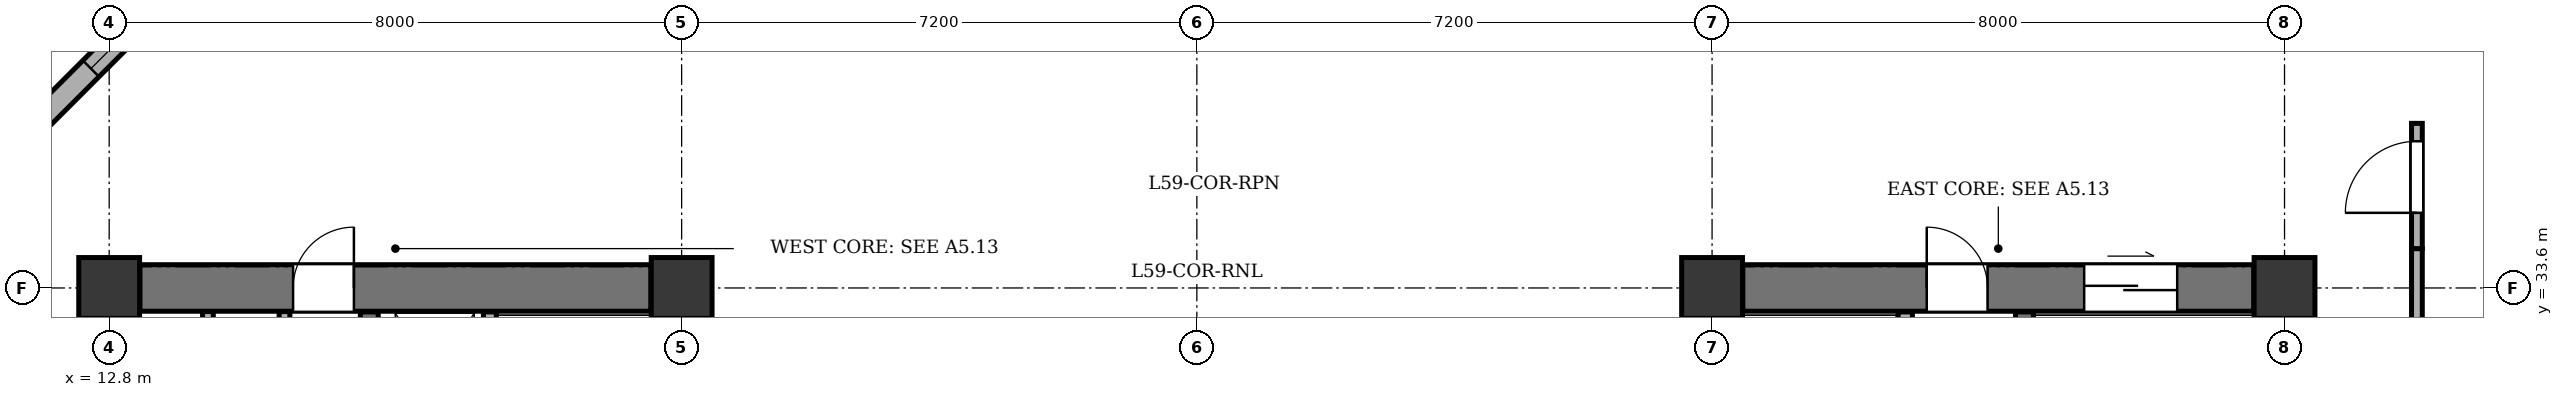
"""IFC4 building model, lengths in metres.
Left out: names, types, materials, properties, quantities, classifications, styles, units other than length and angle.
Written with IfcOpenShell. Run it as: python <this file> out.ifc"""

import sys

from ifc_helpers import new_model, si_unit, direction, frame, frame_2d, origin, origin_2d, place, context, subcontext, project, spatial, rectangle, extrude, element, fill, save


model = new_model("IFC4")
c1 = context("Model", 3, precision=1e-05, world=origin(), true_north=direction((0.0, 1.0)))
c2 = subcontext(c1, "Body", "Model", "MODEL_VIEW")
j1 = project(units=[si_unit("LENGTHUNIT", "METRE"), si_unit("PLANEANGLEUNIT", "RADIAN")], contexts=[c1])
p1 = place(None, origin())
s1 = spatial("IfcSite", under=j1, at=p1, CompositionType="ELEMENT")
p2 = place(p1, origin())
s2 = spatial("IfcBuilding", under=s1, at=p2, CompositionType="ELEMENT")
p3 = place(p2, frame((0.0, 0.0, 227.9)))
s3 = spatial("IfcBuildingStorey", under=s2, at=p3, CompositionType="ELEMENT", Elevation=227.9)
for number, where, z_axis, x_axis in (
    (1, (12.8, 33.6, 0.0), (0.0, 0.0, 1.0), (1.0, 0.0, 0.0)),
    (2, (20.8, 33.6, 0.0), (0.0, 0.0, 1.0), (1.0, 0.0, 0.0)),
    (3, (35.2, 33.6, 0.0), (0.0, 0.0, 1.0), (1.0, 0.0, 0.0)),
    (4, (43.2, 33.6, 0.0), (0.0, 0.0, 1.0), (1.0, 0.0, 0.0)),
):
    element("IfcColumn", number, at=place(p3, frame(where, z_axis=z_axis, x_axis=x_axis)), inside=s3, PredefinedType="COLUMN", context=c2, shape_type="SweptSolid", body=[
        extrude(rectangle(XDim=0.85, YDim=0.85, at=origin_2d()), origin(), (0.0, 0.0, 1.0), 3.4),
    ])
p4 = place(p3, frame((10.88, 35.0, 0.0), z_axis=(0.0, 0.0, 1.0), x_axis=(0.707106781187, 0.707106781187, 0.0)))
e5 = element("IfcWall", 5, at=p4, inside=s3, PredefinedType="STANDARD", context=c2, shape_type="SweptSolid", body=[
    extrude(rectangle(XDim=6.11, YDim=0.32, at=frame_2d((3.055, 0.0))), origin(), (0.0, 0.0, 1.0), 2.725),
])
p5 = place(p4, frame((2.355, 0.0, 0.75)))
e6 = element("IfcOpeningElement", 6, at=p5, cuts=e5, PredefinedType="OPENING", context=c2, shape_type="SweptSolid", body=[
    extrude(rectangle(XDim=1.4, YDim=1.65, at=frame_2d((0.7, 0.825))), frame((0.0, 0.17, 0.0), z_axis=(0.0, -1.0, 0.0), x_axis=(1.0, 0.0, 0.0)), (0.0, 0.0, 1.0), 0.34),
])
p6 = place(p3, frame((13.23, 33.6, 0.0), z_axis=(0.0, 0.0, 1.0), x_axis=(1.0, 0.0, 0.0)))
e7 = element("IfcWall", 7, at=p6, inside=s3, PredefinedType="SHEAR", context=c2, shape_type="SweptSolid", body=[
    extrude(rectangle(XDim=7.14, YDim=0.65, at=frame_2d((3.57, 0.0))), origin(), (0.0, 0.0, 1.0), 3.1),
])
p7 = place(p6, frame((2.14, 0.0, 0.0)))
e8 = element("IfcOpeningElement", 8, at=p7, cuts=e7, PredefinedType="OPENING", context=c2, shape_type="SweptSolid", body=[
    extrude(rectangle(XDim=0.85, YDim=2.02, at=frame_2d((0.425, 1.01))), frame((0.0, 0.335, 0.0), z_axis=(0.0, -1.0, 0.0), x_axis=(1.0, 0.0, 0.0)), (0.0, 0.0, 1.0), 0.67),
])
p8 = place(p3, frame((16.435, 21.135, 0.0), z_axis=(0.0, 0.0, 1.0), x_axis=(0.0, 1.0, 0.0)))
e9 = element("IfcWall", 9, at=p8, inside=s3, PredefinedType="SHEAR", context=c2, shape_type="SweptSolid", body=[
    extrude(rectangle(XDim=12.13, YDim=0.25, at=frame_2d((6.065, 0.0))), origin(), (0.0, 0.0, 1.0), 3.1),
])
p9 = place(p8, frame((0.515, 0.0, 0.0)))
e10 = element("IfcOpeningElement", 10, at=p9, cuts=e9, PredefinedType="OPENING", context=c2, shape_type="SweptSolid", body=[
    extrude(rectangle(XDim=1.2, YDim=2.15, at=frame_2d((0.6, 1.075))), frame((0.0, 0.135, 0.0), z_axis=(0.0, -1.0, 0.0), x_axis=(1.0, 0.0, 0.0)), (0.0, 0.0, 1.0), 0.27),
])
p10 = place(p8, frame((2.665, 0.0, 0.0)))
e11 = element("IfcOpeningElement", 11, at=p10, cuts=e9, PredefinedType="OPENING", context=c2, shape_type="SweptSolid", body=[
    extrude(rectangle(XDim=1.15, YDim=2.15, at=frame_2d((0.575, 1.075))), frame((0.0, 0.135, 0.0), z_axis=(0.0, -1.0, 0.0), x_axis=(1.0, 0.0, 0.0)), (0.0, 0.0, 1.0), 0.27),
])
p11 = place(p3, frame((18.12, 31.17, 0.0), z_axis=(0.0, 0.0, 1.0), x_axis=(0.0, 1.0, 0.0)))
e12 = element("IfcWall", 12, at=p11, inside=s3, PredefinedType="PARTITIONING", context=c2, shape_type="SweptSolid", body=[
    extrude(rectangle(XDim=2.095, YDim=0.18, at=frame_2d((1.047, 0.0))), origin(), (0.0, 0.0, 1.0), 3.1),
])
p12 = place(p3, frame((35.63, 33.6, 0.0), z_axis=(0.0, 0.0, 1.0), x_axis=(1.0, 0.0, 0.0)))
e13 = element("IfcWall", 13, at=p12, inside=s3, PredefinedType="SHEAR", context=c2, shape_type="SweptSolid", body=[
    extrude(rectangle(XDim=7.14, YDim=0.65, at=frame_2d((3.57, 0.0))), origin(), (0.0, 0.0, 1.0), 3.1),
])
p13 = place(p12, frame((4.77, 0.0, 0.0)))
e14 = element("IfcOpeningElement", 14, at=p13, cuts=e13, PredefinedType="OPENING", context=c2, shape_type="SweptSolid", body=[
    extrude(rectangle(XDim=1.3, YDim=2.15, at=frame_2d((0.65, 1.075))), frame((0.0, 0.335, 0.0), z_axis=(0.0, -1.0, 0.0), x_axis=(1.0, 0.0, 0.0)), (0.0, 0.0, 1.0), 0.67),
])
p14 = place(p12, frame((2.57, 0.0, 0.0)))
e15 = element("IfcOpeningElement", 15, at=p14, cuts=e13, PredefinedType="OPENING", context=c2, shape_type="SweptSolid", body=[
    extrude(rectangle(XDim=0.85, YDim=2.02, at=frame_2d((0.425, 1.01))), frame((0.0, 0.335, 0.0), z_axis=(0.0, -1.0, 0.0), x_axis=(1.0, 0.0, 0.0)), (0.0, 0.0, 1.0), 0.67),
])
p15 = place(p3, frame((39.565, 21.135, 0.0), z_axis=(0.0, 0.0, 1.0), x_axis=(0.0, 1.0, 0.0)))
e16 = element("IfcWall", 16, at=p15, inside=s3, PredefinedType="SHEAR", context=c2, shape_type="SweptSolid", body=[
    extrude(rectangle(XDim=12.13, YDim=0.25, at=frame_2d((6.065, 0.0))), origin(), (0.0, 0.0, 1.0), 3.1),
])
p16 = place(p15, frame((0.515, 0.0, 0.0)))
e17 = element("IfcOpeningElement", 17, at=p16, cuts=e16, PredefinedType="OPENING", context=c2, shape_type="SweptSolid", body=[
    extrude(rectangle(XDim=1.2, YDim=2.15, at=frame_2d((0.6, 1.075))), frame((0.0, 0.135, 0.0), z_axis=(0.0, -1.0, 0.0), x_axis=(1.0, 0.0, 0.0)), (0.0, 0.0, 1.0), 0.27),
])
p17 = place(p15, frame((2.665, 0.0, 0.0)))
e18 = element("IfcOpeningElement", 18, at=p17, cuts=e16, PredefinedType="OPENING", context=c2, shape_type="SweptSolid", body=[
    extrude(rectangle(XDim=1.15, YDim=2.15, at=frame_2d((0.575, 1.075))), frame((0.0, 0.135, 0.0), z_axis=(0.0, -1.0, 0.0), x_axis=(1.0, 0.0, 0.0)), (0.0, 0.0, 1.0), 0.27),
])
p18 = place(p3, frame((37.9, 25.27, 0.0), z_axis=(0.0, 0.0, 1.0), x_axis=(0.0, 1.0, 0.0)))
e19 = element("IfcWall", 19, at=p18, inside=s3, PredefinedType="SOLIDWALL", context=c2, shape_type="SweptSolid", body=[
    extrude(rectangle(XDim=7.995, YDim=0.2, at=frame_2d((3.998, 0.0))), origin(), (0.0, 0.0, 1.0), 3.1),
])
p19 = place(p3, frame((14.18, 30.96, 0.0), z_axis=(0.0, 0.0, 1.0), x_axis=(0.0, 1.0, 0.0)))
e20 = element("IfcWall", 20, at=p19, inside=s3, PredefinedType="PARTITIONING", context=c2, shape_type="SweptSolid", body=[
    extrude(rectangle(XDim=2.31, YDim=0.15, at=frame_2d((1.155, 0.0))), origin(), (0.0, 0.0, 1.0), 3.1),
])
p20 = place(p19, frame((0.47, 0.0, 0.0)))
e21 = element("IfcOpeningElement", 21, at=p20, cuts=e20, PredefinedType="OPENING", context=c2, shape_type="SweptSolid", body=[
    extrude(rectangle(XDim=0.85, YDim=2.02, at=frame_2d((0.425, 1.01))), frame((0.0, 0.085, 0.0), z_axis=(0.0, -1.0, 0.0), x_axis=(1.0, 0.0, 0.0)), (0.0, 0.0, 1.0), 0.17),
])
p21 = place(p3, frame((15.25, 30.96, 0.0), z_axis=(0.0, 0.0, 1.0), x_axis=(0.0, 1.0, 0.0)))
e22 = element("IfcWall", 22, at=p21, inside=s3, PredefinedType="PARTITIONING", context=c2, shape_type="SweptSolid", body=[
    extrude(rectangle(XDim=2.31, YDim=0.15, at=frame_2d((1.155, 0.0))), origin(), (0.0, 0.0, 1.0), 3.1),
])
p22 = place(p21, frame((0.47, 0.0, 0.0)))
e23 = element("IfcOpeningElement", 23, at=p22, cuts=e22, PredefinedType="OPENING", context=c2, shape_type="SweptSolid", body=[
    extrude(rectangle(XDim=0.85, YDim=2.02, at=frame_2d((0.425, 1.01))), frame((0.0, 0.085, 0.0), z_axis=(0.0, -1.0, 0.0), x_axis=(1.0, 0.0, 0.0)), (0.0, 0.0, 1.0), 0.17),
])
p23 = place(p3, frame((45.05, 20.25, 0.0), z_axis=(0.0, 0.0, 1.0), x_axis=(0.0, 1.0, 0.0)))
e24 = element("IfcWall", 24, at=p23, inside=s3, PredefinedType="PARTITIONING", context=c2, shape_type="SweptSolid", body=[
    extrude(rectangle(XDim=13.9, YDim=0.15, at=frame_2d((6.95, 0.0))), origin(), (0.0, 0.0, 1.0), 2.725),
])
p24 = place(p3, frame((45.05, 34.15, 0.0), z_axis=(0.0, 0.0, 1.0), x_axis=(0.0, 1.0, 0.0)))
e25 = element("IfcWall", 25, at=p24, inside=s3, PredefinedType="PARTITIONING", context=c2, shape_type="SweptSolid", body=[
    extrude(rectangle(XDim=1.75, YDim=0.15, at=frame_2d((0.875, 0.0))), origin(), (0.0, 0.0, 1.0), 2.725),
])
p25 = place(p24, frame((0.5, 0.0, 0.0)))
e26 = element("IfcOpeningElement", 26, at=p25, cuts=e25, PredefinedType="OPENING", context=c2, shape_type="SweptSolid", body=[
    extrude(rectangle(XDim=1.0, YDim=2.1, at=frame_2d((0.5, 1.05))), frame((0.0, 0.085, 0.0), z_axis=(0.0, -1.0, 0.0), x_axis=(1.0, 0.0, 0.0)), (0.0, 0.0, 1.0), 0.17),
])
p26 = place(p5, origin())
e27 = element("IfcWindow", 27, at=p26, inside=s3, PartitioningType="SINGLE_PANEL", PredefinedType="WINDOW", context=c2, shape_type="SweptSolid", body=[
    extrude(rectangle(XDim=1.4, YDim=1.65, at=frame_2d((0.7, 0.825))), frame((0.0, -0.01, 0.0), z_axis=(0.0, -1.0, 0.0), x_axis=(1.0, 0.0, 0.0)), (0.0, 0.0, 1.0), 0.06),
])
fill(e6, e27)
p27 = place(p7, origin())
e28 = element("IfcDoor", 28, at=p27, inside=s3, OperationType="SINGLE_SWING_RIGHT", PredefinedType="DOOR", context=c2, shape_type="SweptSolid", body=[
    extrude(rectangle(XDim=0.85, YDim=2.02, at=frame_2d((0.425, 1.01))), frame((0.0, 0.025, 0.0), z_axis=(0.0, -1.0, 0.0), x_axis=(1.0, 0.0, 0.0)), (0.0, 0.0, 1.0), 0.05),
])
fill(e8, e28)
p28 = place(p13, origin())
e29 = element("IfcDoor", 29, at=p28, inside=s3, OperationType="DOUBLE_DOOR_SLIDING", PredefinedType="DOOR", context=c2, shape_type="SweptSolid", body=[
    extrude(rectangle(XDim=1.3, YDim=2.15, at=frame_2d((0.65, 1.075))), frame((0.0, 0.025, 0.0), z_axis=(0.0, -1.0, 0.0), x_axis=(1.0, 0.0, 0.0)), (0.0, 0.0, 1.0), 0.05),
])
fill(e14, e29)
p29 = place(p14, origin())
e30 = element("IfcDoor", 30, at=p29, inside=s3, OperationType="SINGLE_SWING_LEFT", PredefinedType="DOOR", context=c2, shape_type="SweptSolid", body=[
    extrude(rectangle(XDim=0.85, YDim=2.02, at=frame_2d((0.425, 1.01))), frame((0.0, 0.025, 0.0), z_axis=(0.0, -1.0, 0.0), x_axis=(1.0, 0.0, 0.0)), (0.0, 0.0, 1.0), 0.05),
])
fill(e15, e30)
p30 = place(p25, origin())
e31 = element("IfcDoor", 31, at=p30, inside=s3, OperationType="SINGLE_SWING_LEFT", PredefinedType="DOOR", context=c2, shape_type="SweptSolid", body=[
    extrude(rectangle(XDim=1.0, YDim=2.1, at=frame_2d((0.5, 1.05))), frame((0.0, 0.025, 0.0), z_axis=(0.0, -1.0, 0.0), x_axis=(1.0, 0.0, 0.0)), (0.0, 0.0, 1.0), 0.05),
])
fill(e26, e31)
save(model, sys.argv[1])
